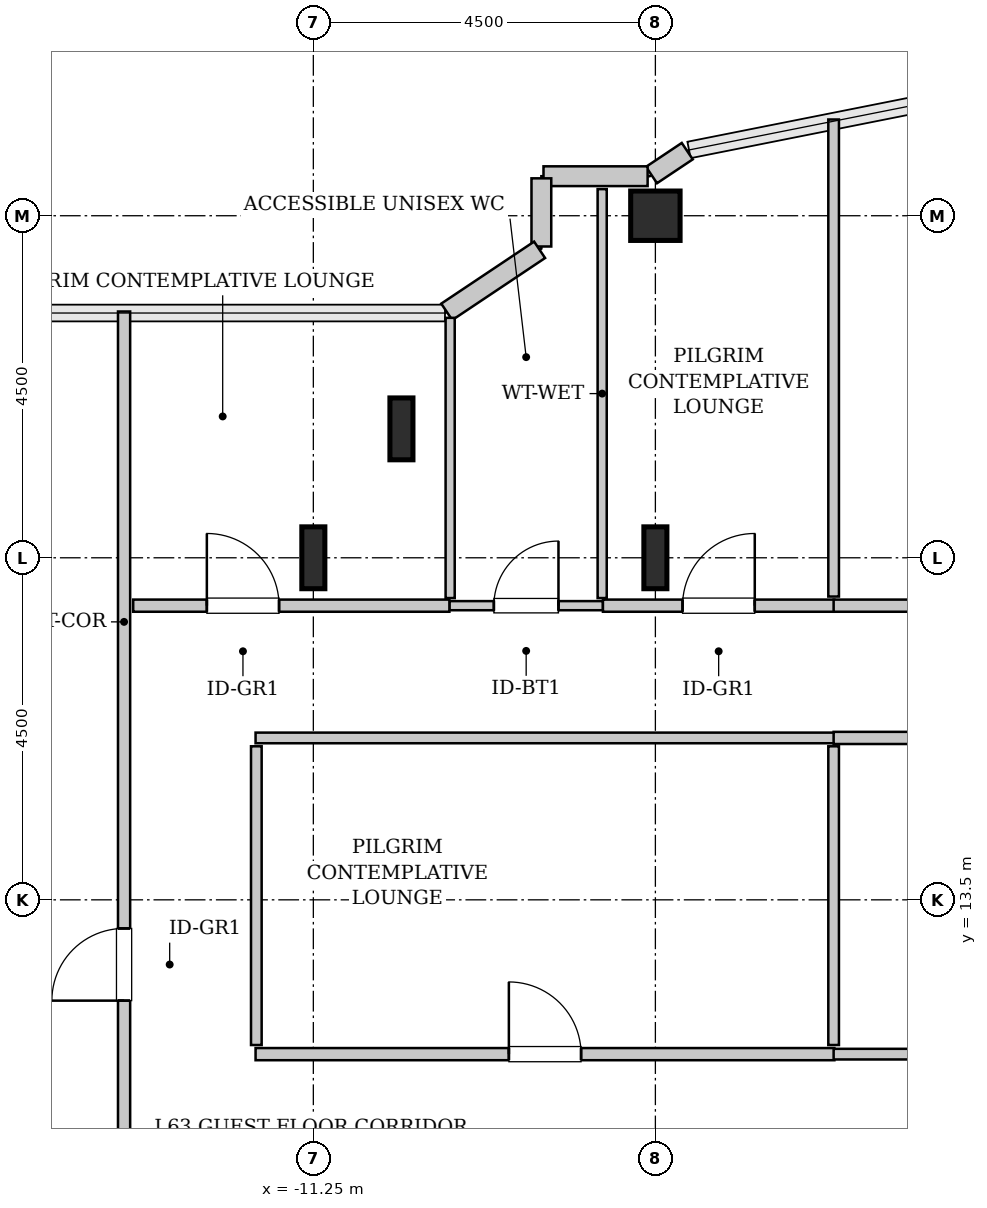
"""IFC4 building model, lengths in metres.
Left out: names, types, materials, properties, quantities, classifications, styles, units other than length and angle.
Written with IfcOpenShell. Run it as: python <this file> out.ifc"""

import sys

from ifc_helpers import new_model, si_unit, direction, frame, frame_2d, origin, origin_2d, place, context, subcontext, project, spatial, rectangle, hollow_rectangle, i_section, extrude, source, transform, mapped, element, fill, save


model = new_model("IFC4")
c1 = context("Model", 3, precision=1e-05, world=origin(), true_north=direction((0.0, 1.0)))
c2 = subcontext(c1, "Body", "Model", "MODEL_VIEW")
j1 = project(units=[si_unit("LENGTHUNIT", "METRE"), si_unit("PLANEANGLEUNIT", "RADIAN")], contexts=[c1])
p1 = place(None, origin())
s1 = spatial("IfcSite", under=j1, at=p1, CompositionType="ELEMENT")
p2 = place(p1, origin())
s2 = spatial("IfcBuilding", under=s1, at=p2, CompositionType="ELEMENT")
p3 = place(p2, frame((0.0, 0.0, 252.2)))
s3 = spatial("IfcBuildingStorey", under=s2, at=p3, CompositionType="ELEMENT", Elevation=252.2)
m1 = source(origin(), c2, "Body", "SweptSolid", [
    extrude(i_section(OverallWidth=0.303, OverallDepth=0.814, WebThickness=0.021, FlangeThickness=0.04, FilletRadius=0.03, at=origin_2d()), origin(), (0.0, 0.0, 1.0), 3.8),
])
for number, where, z_axis, x_axis in (
    (1, (-11.25, 18.0, 0.0), (0.0, 0.0, 1.0), (1.0, 0.0, 0.0)),
    (2, (-10.091, 19.696, 0.0), (0.0, 0.0, 1.0), (1.0, 0.0, 0.0)),
    (3, (-6.75, 18.0, 0.0), (0.0, 0.0, 1.0), (1.0, 0.0, 0.0)),
):
    element("IfcColumn", number, at=place(p3, frame(where, z_axis=z_axis, x_axis=x_axis)), inside=s3, PredefinedType="COLUMN", context=c2, shape_type="MappedRepresentation", body=[
        mapped(m1, transform((0.0, 0.0, 0.0), x_axis=(1.0, 0.0, 0.0), y_axis=(0.0, 1.0, 0.0), z_axis=(0.0, 0.0, 1.0), scale=1.0)),
    ])
m2 = source(origin(), c2, "Body", "SweptSolid", [
    extrude(hollow_rectangle(XDim=0.65, YDim=0.65, WallThickness=0.032, InnerFilletRadius=0.032, OuterFilletRadius=0.064, at=origin_2d()), origin(), (0.0, 0.0, 1.0), 3.8),
])
p4 = place(p3, frame((-6.75, 22.5, 0.0), z_axis=(0.0, 0.0, 1.0), x_axis=(1.0, 0.0, 0.0)))
e4 = element("IfcColumn", 4, at=p4, inside=s3, PredefinedType="COLUMN", context=c2, shape_type="MappedRepresentation", body=[
    mapped(m2, transform((0.0, 0.0, 0.0), x_axis=(1.0, 0.0, 0.0), y_axis=(0.0, 1.0, 0.0), z_axis=(0.0, 0.0, 1.0), scale=1.0)),
])
m3 = source(origin(), c2, "Body", "SweptSolid", [
    extrude(rectangle(XDim=0.565, YDim=0.26, at=frame_2d((0.283, 0.0))), origin(), (0.0, 0.0, 1.0), 3.55),
])
p5 = place(p3, frame((-6.331, 23.35, 0.0), z_axis=(0.0, 0.0, 1.0), x_axis=(-0.831651492666, -0.555297933317, 0.0)))
e5 = element("IfcWall", 5, at=p5, inside=s3, PredefinedType="SOLIDWALL", context=c2, shape_type="MappedRepresentation", body=[
    mapped(m3, transform((0.0, 0.0, 0.0), x_axis=(1.0, 0.0, 0.0), y_axis=(0.0, 1.0, 0.0), z_axis=(0.0, 0.0, 1.0), scale=1.0)),
])
m4 = source(origin(), c2, "Body", "SweptSolid", [
    extrude(rectangle(XDim=1.37, YDim=0.26, at=frame_2d((0.685, 0.0))), origin(), (0.0, 0.0, 1.0), 3.55),
])
p6 = place(p3, frame((-6.852, 23.02, 0.0), z_axis=(0.0, 0.0, 1.0), x_axis=(-1.0, 0.0, 0.0)))
e6 = element("IfcWall", 6, at=p6, inside=s3, PredefinedType="SOLIDWALL", context=c2, shape_type="MappedRepresentation", body=[
    mapped(m4, transform((0.0, 0.0, 0.0), x_axis=(1.0, 0.0, 0.0), y_axis=(0.0, 1.0, 0.0), z_axis=(0.0, 0.0, 1.0), scale=1.0)),
])
m5 = source(origin(), c2, "Body", "SweptSolid", [
    extrude(rectangle(XDim=0.897, YDim=0.26, at=frame_2d((0.448, 0.0))), origin(), (0.0, 0.0, 1.0), 3.55),
])
p7 = place(p3, frame((-8.25, 22.992, 0.0), z_axis=(0.0, 0.0, 1.0), x_axis=(0.0, -1.0, 0.0)))
e7 = element("IfcWall", 7, at=p7, inside=s3, PredefinedType="SOLIDWALL", context=c2, shape_type="MappedRepresentation", body=[
    mapped(m5, transform((0.0, 0.0, 0.0), x_axis=(1.0, 0.0, 0.0), y_axis=(0.0, 1.0, 0.0), z_axis=(0.0, 0.0, 1.0), scale=1.0)),
])
m6 = source(origin(), c2, "Body", "SweptSolid", [
    extrude(rectangle(XDim=1.469, YDim=0.26, at=frame_2d((0.734, 0.0))), origin(), (0.0, 0.0, 1.0), 3.55),
])
p8 = place(p3, frame((-8.273, 22.052, 0.0), z_axis=(0.0, 0.0, 1.0), x_axis=(-0.831461760506, -0.555581983884, 0.0)))
e8 = element("IfcWall", 8, at=p8, inside=s3, PredefinedType="SOLIDWALL", context=c2, shape_type="MappedRepresentation", body=[
    mapped(m6, transform((0.0, 0.0, 0.0), x_axis=(1.0, 0.0, 0.0), y_axis=(0.0, 1.0, 0.0), z_axis=(0.0, 0.0, 1.0), scale=1.0)),
])
m7 = source(origin(), c2, "Body", "SweptSolid", [
    extrude(rectangle(XDim=2.02, YDim=0.12, at=frame_2d((1.01, 0.0))), origin(), (0.0, 0.0, 1.0), 3.535),
])
p9 = place(p3, frame((-9.46, 17.37, 0.0), z_axis=(0.0, 0.0, 1.0), x_axis=(1.0, 0.0, 0.0)))
e9 = element("IfcWall", 9, at=p9, inside=s3, PredefinedType="PLUMBINGWALL", context=c2, shape_type="MappedRepresentation", body=[
    mapped(m7, transform((0.0, 0.0, 0.0), x_axis=(1.0, 0.0, 0.0), y_axis=(0.0, 1.0, 0.0), z_axis=(0.0, 0.0, 1.0), scale=1.0)),
])
p10 = place(p9, frame((0.585, 0.0, 0.0)))
e10 = element("IfcOpeningElement", 10, at=p10, cuts=e9, PredefinedType="OPENING", context=c2, shape_type="SweptSolid", body=[
    extrude(rectangle(XDim=0.85, YDim=2.1, at=frame_2d((0.425, 1.05))), frame((0.0, 0.07, 0.0), z_axis=(0.0, -1.0, 0.0), x_axis=(1.0, 0.0, 0.0)), (0.0, 0.0, 1.0), 0.14),
])
m8 = source(origin(), c2, "Body", "SweptSolid", [
    extrude(rectangle(XDim=5.38, YDim=0.12, at=frame_2d((2.69, 0.0))), origin(), (0.0, 0.0, 1.0), 3.535),
])
p11 = place(p3, frame((-7.45, 17.47, 0.0), z_axis=(0.0, 0.0, 1.0), x_axis=(0.0, 1.0, 0.0)))
e11 = element("IfcWall", 11, at=p11, inside=s3, PredefinedType="PLUMBINGWALL", context=c2, shape_type="MappedRepresentation", body=[
    mapped(m8, transform((0.0, 0.0, 0.0), x_axis=(1.0, 0.0, 0.0), y_axis=(0.0, 1.0, 0.0), z_axis=(0.0, 0.0, 1.0), scale=1.0)),
])
m9 = source(origin(), c2, "Body", "SweptSolid", [
    extrude(rectangle(XDim=3.687, YDim=0.12, at=frame_2d((1.843, 0.0))), origin(), (0.0, 0.0, 1.0), 3.535),
])
p12 = place(p3, frame((-9.45, 17.47, 0.0), z_axis=(0.0, 0.0, 1.0), x_axis=(0.0, 1.0, 0.0)))
e12 = element("IfcWall", 12, at=p12, inside=s3, PredefinedType="PLUMBINGWALL", context=c2, shape_type="MappedRepresentation", body=[
    mapped(m9, transform((0.0, 0.0, 0.0), x_axis=(1.0, 0.0, 0.0), y_axis=(0.0, 1.0, 0.0), z_axis=(0.0, 0.0, 1.0), scale=1.0)),
])
m10 = source(origin(), c2, "Body", "SweptSolid", [
    extrude(rectangle(XDim=13.353, YDim=0.16, at=frame_2d((6.676, 0.0))), origin(), (0.0, 0.0, 1.0), 3.535),
])
p13 = place(p3, frame((-13.74, 7.887, 0.0), z_axis=(0.0, 0.0, 1.0), x_axis=(0.0, 1.0, 0.0)))
e13 = element("IfcWall", 13, at=p13, inside=s3, PredefinedType="PARTITIONING", context=c2, shape_type="MappedRepresentation", body=[
    mapped(m10, transform((0.0, 0.0, 0.0), x_axis=(1.0, 0.0, 0.0), y_axis=(0.0, 1.0, 0.0), z_axis=(0.0, 0.0, 1.0), scale=1.0)),
])
p14 = place(p13, frame((4.286, 0.0, 0.0)))
e14 = element("IfcOpeningElement", 14, at=p14, cuts=e13, PredefinedType="OPENING", context=c2, shape_type="SweptSolid", body=[
    extrude(rectangle(XDim=0.95, YDim=2.1, at=frame_2d((0.475, 1.05))), frame((0.0, 0.09, 0.0), z_axis=(0.0, -1.0, 0.0), x_axis=(1.0, 0.0, 0.0)), (0.0, 0.0, 1.0), 0.18),
])
m11 = source(origin(), c2, "Body", "SweptSolid", [
    extrude(rectangle(XDim=7.615, YDim=0.16, at=frame_2d((3.808, 0.0))), origin(), (0.0, 0.0, 1.0), 3.535),
])
p15 = place(p3, frame((-12.01, 11.47, 0.0), z_axis=(0.0, 0.0, 1.0), x_axis=(1.0, 0.0, 0.0)))
e15 = element("IfcWall", 15, at=p15, inside=s3, PredefinedType="PARTITIONING", context=c2, shape_type="MappedRepresentation", body=[
    mapped(m11, transform((0.0, 0.0, 0.0), x_axis=(1.0, 0.0, 0.0), y_axis=(0.0, 1.0, 0.0), z_axis=(0.0, 0.0, 1.0), scale=1.0)),
])
p16 = place(p15, frame((3.333, 0.0, 0.0)))
e16 = element("IfcOpeningElement", 16, at=p16, cuts=e15, PredefinedType="OPENING", context=c2, shape_type="SweptSolid", body=[
    extrude(rectangle(XDim=0.95, YDim=2.1, at=frame_2d((0.475, 1.05))), frame((0.0, 0.09, 0.0), z_axis=(0.0, -1.0, 0.0), x_axis=(1.0, 0.0, 0.0)), (0.0, 0.0, 1.0), 0.18),
])
m12 = source(origin(), c2, "Body", "SweptSolid", [
    extrude(rectangle(XDim=7.615, YDim=0.14, at=frame_2d((3.808, 0.0))), origin(), (0.0, 0.0, 1.0), 3.535),
])
p17 = place(p3, frame((-12.01, 15.63, 0.0), z_axis=(0.0, 0.0, 1.0), x_axis=(1.0, 0.0, 0.0)))
e17 = element("IfcWall", 17, at=p17, inside=s3, PredefinedType="PARTITIONING", context=c2, shape_type="MappedRepresentation", body=[
    mapped(m12, transform((0.0, 0.0, 0.0), x_axis=(1.0, 0.0, 0.0), y_axis=(0.0, 1.0, 0.0), z_axis=(0.0, 0.0, 1.0), scale=1.0)),
])
m13 = source(origin(), c2, "Body", "SweptSolid", [
    extrude(rectangle(XDim=3.93, YDim=0.14, at=frame_2d((1.965, 0.0))), origin(), (0.0, 0.0, 1.0), 3.535),
])
for number, where, z_axis, x_axis in (
    (18, (-12.0, 11.59, 0.0), (0.0, 0.0, 1.0), (0.0, 1.0, 0.0)),
    (19, (-4.405, 11.59, 0.0), (0.0, 0.0, 1.0), (0.0, 1.0, 0.0)),
):
    element("IfcWall", number, at=place(p3, frame(where, z_axis=z_axis, x_axis=x_axis)), inside=s3, PredefinedType="PARTITIONING", context=c2, shape_type="MappedRepresentation", body=[
        mapped(m13, transform((0.0, 0.0, 0.0), x_axis=(1.0, 0.0, 0.0), y_axis=(0.0, 1.0, 0.0), z_axis=(0.0, 0.0, 1.0), scale=1.0)),
    ])
m14 = source(origin(), c2, "Body", "SweptSolid", [
    extrude(rectangle(XDim=3.045, YDim=0.16, at=frame_2d((1.522, 0.0))), origin(), (0.0, 0.0, 1.0), 3.535),
])
p18 = place(p3, frame((-7.44, 17.37, 0.0), z_axis=(0.0, 0.0, 1.0), x_axis=(1.0, 0.0, 0.0)))
e20 = element("IfcWall", 20, at=p18, inside=s3, PredefinedType="PARTITIONING", context=c2, shape_type="MappedRepresentation", body=[
    mapped(m14, transform((0.0, 0.0, 0.0), x_axis=(1.0, 0.0, 0.0), y_axis=(0.0, 1.0, 0.0), z_axis=(0.0, 0.0, 1.0), scale=1.0)),
])
p19 = place(p18, frame((1.048, 0.0, 0.0)))
e21 = element("IfcOpeningElement", 21, at=p19, cuts=e20, PredefinedType="OPENING", context=c2, shape_type="SweptSolid", body=[
    extrude(rectangle(XDim=0.95, YDim=2.1, at=frame_2d((0.475, 1.05))), frame((0.0, 0.09, 0.0), z_axis=(0.0, -1.0, 0.0), x_axis=(1.0, 0.0, 0.0)), (0.0, 0.0, 1.0), 0.18),
])
m15 = source(origin(), c2, "Body", "SweptSolid", [
    extrude(rectangle(XDim=6.276, YDim=0.14, at=frame_2d((3.138, 0.0))), origin(), (0.0, 0.0, 1.0), 3.535),
])
p20 = place(p3, frame((-4.405, 17.49, 0.0), z_axis=(0.0, 0.0, 1.0), x_axis=(0.0, 1.0, 0.0)))
e22 = element("IfcWall", 22, at=p20, inside=s3, PredefinedType="PARTITIONING", context=c2, shape_type="MappedRepresentation", body=[
    mapped(m15, transform((0.0, 0.0, 0.0), x_axis=(1.0, 0.0, 0.0), y_axis=(0.0, 1.0, 0.0), z_axis=(0.0, 0.0, 1.0), scale=1.0)),
])
m16 = source(origin(), c2, "Body", "SweptSolid", [
    extrude(rectangle(XDim=4.16, YDim=0.16, at=frame_2d((2.08, 0.0))), origin(), (0.0, 0.0, 1.0), 3.535),
])
p21 = place(p3, frame((-13.62, 17.37, 0.0), z_axis=(0.0, 0.0, 1.0), x_axis=(1.0, 0.0, 0.0)))
e23 = element("IfcWall", 23, at=p21, inside=s3, PredefinedType="PARTITIONING", context=c2, shape_type="MappedRepresentation", body=[
    mapped(m16, transform((0.0, 0.0, 0.0), x_axis=(1.0, 0.0, 0.0), y_axis=(0.0, 1.0, 0.0), z_axis=(0.0, 0.0, 1.0), scale=1.0)),
])
p22 = place(p21, frame((0.969, 0.0, 0.0)))
e24 = element("IfcOpeningElement", 24, at=p22, cuts=e23, PredefinedType="OPENING", context=c2, shape_type="SweptSolid", body=[
    extrude(rectangle(XDim=0.95, YDim=2.1, at=frame_2d((0.475, 1.05))), frame((0.0, 0.09, 0.0), z_axis=(0.0, -1.0, 0.0), x_axis=(1.0, 0.0, 0.0)), (0.0, 0.0, 1.0), 0.18),
])
m17 = source(origin(), c2, "Body", "SweptSolid", [
    extrude(rectangle(XDim=7.01, YDim=0.16, at=frame_2d((3.505, 0.0))), origin(), (0.0, 0.0, 1.0), 3.535),
])
p23 = place(p3, frame((-4.405, 17.37, 0.0), z_axis=(0.0, 0.0, 1.0), x_axis=(1.0, 0.0, 0.0)))
e25 = element("IfcWall", 25, at=p23, inside=s3, PredefinedType="PARTITIONING", context=c2, shape_type="MappedRepresentation", body=[
    mapped(m17, transform((0.0, 0.0, 0.0), x_axis=(1.0, 0.0, 0.0), y_axis=(0.0, 1.0, 0.0), z_axis=(0.0, 0.0, 1.0), scale=1.0)),
])
p24 = place(p23, frame((3.03, 0.0, 0.0)))
e26 = element("IfcOpeningElement", 26, at=p24, cuts=e25, PredefinedType="OPENING", context=c2, shape_type="SweptSolid", body=[
    extrude(rectangle(XDim=0.95, YDim=2.1, at=frame_2d((0.475, 1.05))), frame((0.0, 0.09, 0.0), z_axis=(0.0, -1.0, 0.0), x_axis=(1.0, 0.0, 0.0)), (0.0, 0.0, 1.0), 0.18),
])
p25 = place(p3, frame((-4.405, 15.63, 0.0), z_axis=(0.0, 0.0, 1.0), x_axis=(1.0, 0.0, 0.0)))
e27 = element("IfcWall", 27, at=p25, inside=s3, PredefinedType="PARTITIONING", context=c2, shape_type="MappedRepresentation", body=[
    mapped(m17, transform((0.0, 0.0, 0.0), x_axis=(1.0, 0.0, 0.0), y_axis=(0.0, 1.0, 0.0), z_axis=(0.0, 0.0, 1.0), scale=1.0)),
])
p26 = place(p25, frame((3.03, 0.0, 0.0)))
e28 = element("IfcOpeningElement", 28, at=p26, cuts=e27, PredefinedType="OPENING", context=c2, shape_type="SweptSolid", body=[
    extrude(rectangle(XDim=0.95, YDim=2.1, at=frame_2d((0.475, 1.05))), frame((0.0, 0.09, 0.0), z_axis=(0.0, -1.0, 0.0), x_axis=(1.0, 0.0, 0.0)), (0.0, 0.0, 1.0), 0.18),
])
m18 = source(origin(), c2, "Body", "SweptSolid", [
    extrude(rectangle(XDim=7.01, YDim=0.14, at=frame_2d((3.505, 0.0))), origin(), (0.0, 0.0, 1.0), 3.535),
])
p27 = place(p3, frame((-4.405, 11.47, 0.0), z_axis=(0.0, 0.0, 1.0), x_axis=(1.0, 0.0, 0.0)))
e29 = element("IfcWall", 29, at=p27, inside=s3, PredefinedType="PARTITIONING", context=c2, shape_type="MappedRepresentation", body=[
    mapped(m18, transform((0.0, 0.0, 0.0), x_axis=(1.0, 0.0, 0.0), y_axis=(0.0, 1.0, 0.0), z_axis=(0.0, 0.0, 1.0), scale=1.0)),
])
m19 = source(origin(), c2, "Body", "SweptSolid", [
    extrude(rectangle(XDim=0.85, YDim=2.1, at=frame_2d((0.425, 1.05))), frame((0.0, 0.025, 0.0), z_axis=(0.0, -1.0, 0.0), x_axis=(1.0, 0.0, 0.0)), (0.0, 0.0, 1.0), 0.05),
])
p28 = place(p10, origin())
e30 = element("IfcDoor", 30, at=p28, inside=s3, OperationType="SINGLE_SWING_RIGHT", PredefinedType="DOOR", context=c2, shape_type="MappedRepresentation", body=[
    mapped(m19, transform((0.0, 0.0, 0.0), x_axis=(1.0, 0.0, 0.0), y_axis=(0.0, 1.0, 0.0), z_axis=(0.0, 0.0, 1.0), scale=1.0)),
])
fill(e10, e30)
m20 = source(origin(), c2, "Body", "SweptSolid", [
    extrude(rectangle(XDim=0.95, YDim=2.1, at=frame_2d((0.475, 1.05))), frame((0.0, 0.025, 0.0), z_axis=(0.0, -1.0, 0.0), x_axis=(1.0, 0.0, 0.0)), (0.0, 0.0, 1.0), 0.05),
])
p29 = place(p14, origin())
e31 = element("IfcDoor", 31, at=p29, inside=s3, OperationType="SINGLE_SWING_LEFT", PredefinedType="DOOR", context=c2, shape_type="MappedRepresentation", body=[
    mapped(m20, transform((0.0, 0.0, 0.0), x_axis=(1.0, 0.0, 0.0), y_axis=(0.0, 1.0, 0.0), z_axis=(0.0, 0.0, 1.0), scale=1.0)),
])
fill(e14, e31)
p30 = place(p16, origin())
e32 = element("IfcDoor", 32, at=p30, inside=s3, OperationType="SINGLE_SWING_LEFT", PredefinedType="DOOR", context=c2, shape_type="MappedRepresentation", body=[
    mapped(m20, transform((0.0, 0.0, 0.0), x_axis=(1.0, 0.0, 0.0), y_axis=(0.0, 1.0, 0.0), z_axis=(0.0, 0.0, 1.0), scale=1.0)),
])
fill(e16, e32)
p31 = place(p19, origin())
e33 = element("IfcDoor", 33, at=p31, inside=s3, OperationType="SINGLE_SWING_RIGHT", PredefinedType="DOOR", context=c2, shape_type="MappedRepresentation", body=[
    mapped(m20, transform((0.0, 0.0, 0.0), x_axis=(1.0, 0.0, 0.0), y_axis=(0.0, 1.0, 0.0), z_axis=(0.0, 0.0, 1.0), scale=1.0)),
])
fill(e21, e33)
p32 = place(p22, origin())
e34 = element("IfcDoor", 34, at=p32, inside=s3, OperationType="SINGLE_SWING_LEFT", PredefinedType="DOOR", context=c2, shape_type="MappedRepresentation", body=[
    mapped(m20, transform((0.0, 0.0, 0.0), x_axis=(1.0, 0.0, 0.0), y_axis=(0.0, 1.0, 0.0), z_axis=(0.0, 0.0, 1.0), scale=1.0)),
])
fill(e24, e34)
save(model, sys.argv[1])
